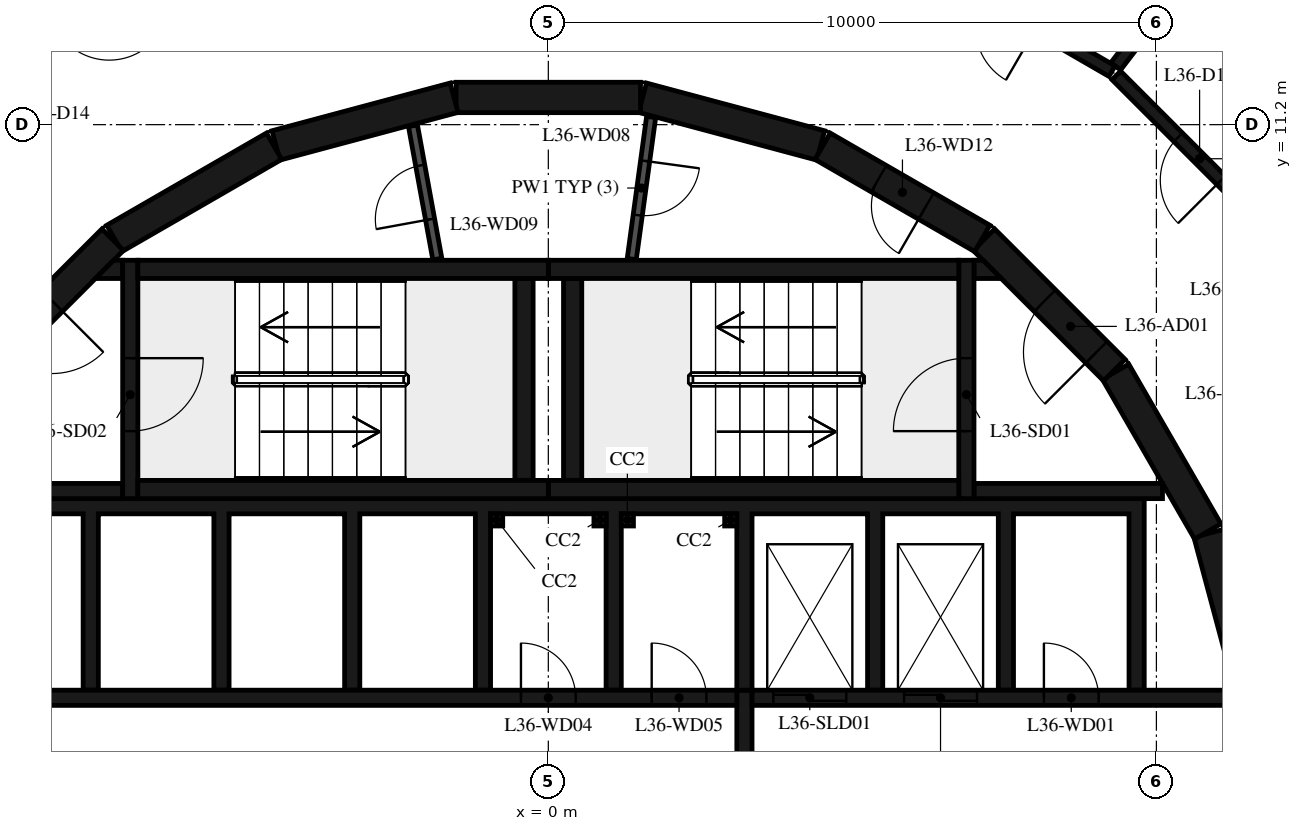
"""IFC4 building model, lengths in metres.
Left out: names, types, materials, properties, quantities, classifications, styles, units other than length and angle.
Written with IfcOpenShell. Run it as: python <this file> out.ifc"""

import sys

from ifc_helpers import new_model, si_unit, direction, frame, frame_2d, origin, origin_2d, place, context, subcontext, project, spatial, polyline, rectangle, outline, extrude, element, fill, save


model = new_model("IFC4")
c1 = context("Model", 3, precision=1e-05, world=origin(), true_north=direction((0.0, 1.0)))
c2 = subcontext(c1, "Body", "Model", "MODEL_VIEW")
j1 = project(units=[si_unit("LENGTHUNIT", "METRE"), si_unit("PLANEANGLEUNIT", "RADIAN")], contexts=[c1])
p1 = place(None, origin())
s1 = spatial("IfcSite", under=j1, at=p1, CompositionType="ELEMENT")
p2 = place(p1, origin())
s2 = spatial("IfcBuilding", under=s1, at=p2, CompositionType="ELEMENT")
p3 = place(p2, frame((0.0, 0.0, 144.9)))
s3 = spatial("IfcBuildingStorey", under=s2, at=p3, CompositionType="ELEMENT", Elevation=144.9)
for number, where, z_axis, x_axis in (
    (1, (-0.85, 4.7, 0.0), (0.0, 0.0, 1.0), (1.0, 0.0, 0.0)),
    (2, (0.85, 4.7, 0.0), (0.0, 0.0, 1.0), (1.0, 0.0, 0.0)),
    (3, (1.3, 4.7, 0.0), (0.0, 0.0, 1.0), (1.0, 0.0, 0.0)),
    (4, (3.0, 4.7, 0.0), (0.0, 0.0, 1.0), (1.0, 0.0, 0.0)),
):
    element("IfcColumn", number, at=place(p3, frame(where, z_axis=z_axis, x_axis=x_axis)), inside=s3, PredefinedType="COLUMN", context=c2, shape_type="SweptSolid", body=[
        extrude(rectangle(XDim=0.2, YDim=0.2, at=origin_2d()), origin(), (0.0, 0.0, 1.0), 4.75),
    ])
for number, where, z_axis, x_axis in (
    (5, (11.643, 1.55, 0.0), (0.0, 0.0, 1.0), (-0.259, 0.966, 0.0)),
    (6, (10.845, 4.51, 0.0), (0.0, 0.0, 1.0), (-0.5, 0.866, 0.0)),
):
    element("IfcWall", number, at=place(p3, frame(where, z_axis=z_axis, x_axis=x_axis)), inside=s3, PredefinedType="SHEAR", context=c2, shape_type="SweptSolid", body=[
        extrude(rectangle(XDim=3.033, YDim=0.5, at=frame_2d((1.516, 0.0))), origin(), (0.0, 0.0, 1.0), 6.35),
    ])
p4 = place(p3, frame((9.308, 7.164, 0.0), z_axis=(0.0, 0.0, 1.0), x_axis=(-0.707106781187, 0.707106781187, 0.0)))
e7 = element("IfcWall", 7, at=p4, inside=s3, PredefinedType="SHEAR", context=c2, shape_type="SweptSolid", body=[
    extrude(rectangle(XDim=3.032, YDim=0.5, at=frame_2d((1.516, 0.0))), origin(), (0.0, 0.0, 1.0), 6.35),
])
p5 = place(p4, frame((0.416, 0.0, 0.0)))
e8 = element("IfcOpeningElement", 8, at=p5, cuts=e7, PredefinedType="OPENING", context=c2, shape_type="SweptSolid", body=[
    extrude(rectangle(XDim=1.2, YDim=2.1, at=frame_2d((0.6, 1.05))), frame((0.0, 0.26, 0.0), z_axis=(0.0, -1.0, 0.0), x_axis=(1.0, 0.0, 0.0)), (0.0, 0.0, 1.0), 0.52),
])
p6 = place(p3, frame((7.137, 9.329, 0.0), z_axis=(0.0, 0.0, 1.0), x_axis=(-0.865975092491, 0.500087131594, 0.0)))
e9 = element("IfcWall", 9, at=p6, inside=s3, PredefinedType="SHEAR", context=c2, shape_type="SweptSolid", body=[
    extrude(rectangle(XDim=3.033, YDim=0.5, at=frame_2d((1.516, 0.0))), origin(), (0.0, 0.0, 1.0), 6.35),
])
p7 = place(p6, frame((1.066, 0.0, 0.0)))
e10 = element("IfcOpeningElement", 10, at=p7, cuts=e9, PredefinedType="OPENING", context=c2, shape_type="SweptSolid", body=[
    extrude(rectangle(XDim=0.9, YDim=2.1, at=frame_2d((0.45, 1.05))), frame((0.0, 0.26, 0.0), z_axis=(0.0, -1.0, 0.0), x_axis=(1.0, 0.0, 0.0)), (0.0, 0.0, 1.0), 0.52),
])
for number, where, z_axis, x_axis in (
    (11, (4.479, 10.858, 0.0), (0.0, 0.0, 1.0), (-0.966, 0.259, 0.0)),
    (12, (1.516, 11.647, 0.0), (0.0, 0.0, 1.0), (-1.0, 0.0, 0.0)),
    (13, (-1.55, 11.643, 0.0), (0.0, 0.0, 1.0), (-0.966, -0.259, 0.0)),
    (14, (-4.51, 10.845, 0.0), (0.0, 0.0, 1.0), (-0.866, -0.5, 0.0)),
):
    element("IfcWall", number, at=place(p3, frame(where, z_axis=z_axis, x_axis=x_axis)), inside=s3, PredefinedType="SHEAR", context=c2, shape_type="SweptSolid", body=[
        extrude(rectangle(XDim=3.033, YDim=0.5, at=frame_2d((1.516, 0.0))), origin(), (0.0, 0.0, 1.0), 6.35),
    ])
p8 = place(p3, frame((-7.164, 9.308, 0.0), z_axis=(0.0, 0.0, 1.0), x_axis=(-0.707106781187, -0.707106781187, 0.0)))
e15 = element("IfcWall", 15, at=p8, inside=s3, PredefinedType="SHEAR", context=c2, shape_type="SweptSolid", body=[
    extrude(rectangle(XDim=3.032, YDim=0.5, at=frame_2d((1.516, 0.0))), origin(), (0.0, 0.0, 1.0), 6.35),
])
p9 = place(p8, frame((1.416, 0.0, 0.0)))
e16 = element("IfcOpeningElement", 16, at=p9, cuts=e15, PredefinedType="OPENING", context=c2, shape_type="SweptSolid", body=[
    extrude(rectangle(XDim=1.2, YDim=2.1, at=frame_2d((0.6, 1.05))), frame((0.0, 0.26, 0.0), z_axis=(0.0, -1.0, 0.0), x_axis=(1.0, 0.0, 0.0)), (0.0, 0.0, 1.0), 0.52),
])
for number, where, z_axis, x_axis in (
    (17, (0.0, 5.2, 0.0), (0.0, 0.0, 1.0), (1.0, 0.0, 0.0)),
    (18, (0.0, 8.82, 0.0), (0.0, 0.0, 1.0), (1.0, 0.0, 0.0)),
):
    element("IfcWall", number, at=place(p3, frame(where, z_axis=z_axis, x_axis=x_axis)), inside=s3, PredefinedType="SHEAR", context=c2, shape_type="SweptSolid", body=[
        extrude(rectangle(XDim=6.75, YDim=0.3, at=frame_2d((3.375, 0.0))), origin(), (0.0, 0.0, 1.0), 6.35),
    ])
p10 = place(p3, frame((0.4, 5.35, 0.0), z_axis=(0.0, 0.0, 1.0), x_axis=(0.0, 1.0, 0.0)))
e19 = element("IfcWall", 19, at=p10, inside=s3, PredefinedType="SHEAR", context=c2, shape_type="SweptSolid", body=[
    extrude(rectangle(XDim=3.32, YDim=0.3, at=frame_2d((1.66, 0.0))), origin(), (0.0, 0.0, 1.0), 6.35),
])
p11 = place(p3, frame((6.875, 5.05, 0.0), z_axis=(0.0, 0.0, 1.0), x_axis=(0.0, 1.0, 0.0)))
e20 = element("IfcWall", 20, at=p11, inside=s3, PredefinedType="SHEAR", context=c2, shape_type="SweptSolid", body=[
    extrude(rectangle(XDim=3.92, YDim=0.25, at=frame_2d((1.96, 0.0))), origin(), (0.0, 0.0, 1.0), 6.35),
])
p12 = place(p11, frame((1.11, 0.0, 0.0)))
e21 = element("IfcOpeningElement", 21, at=p12, cuts=e20, PredefinedType="OPENING", context=c2, shape_type="SweptSolid", body=[
    extrude(rectangle(XDim=1.2, YDim=2.1, at=frame_2d((0.6, 1.05))), frame((0.0, 0.135, 0.0), z_axis=(0.0, -1.0, 0.0), x_axis=(1.0, 0.0, 0.0)), (0.0, 0.0, 1.0), 0.27),
])
p13 = place(p3, frame((7.0, 5.175, 0.0), z_axis=(0.0, 0.0, 1.0), x_axis=(1.0, 0.0, 0.0)))
e22 = element("IfcWall", 22, at=p13, inside=s3, PredefinedType="SHEAR", context=c2, shape_type="SweptSolid", body=[
    extrude(rectangle(XDim=3.1, YDim=0.25, at=frame_2d((1.55, 0.0))), origin(), (0.0, 0.0, 1.0), 6.35),
])
p14 = place(p3, origin())
e23 = element("IfcWall", 23, at=p14, inside=s3, PredefinedType="SHEAR", context=c2, shape_type="SweptSolid", body=[
    extrude(outline(polyline([(7.448, 8.67), (7.0, 8.67), (7.0, 8.97), (7.148, 8.97), (7.448, 8.67)])), origin(), (0.0, 0.0, 1.0), 6.35),
])
for number, where, z_axis, x_axis in (
    (24, (-6.75, 5.2, 0.0), (0.0, 0.0, 1.0), (1.0, 0.0, 0.0)),
    (25, (-6.75, 8.82, 0.0), (0.0, 0.0, 1.0), (1.0, 0.0, 0.0)),
):
    element("IfcWall", number, at=place(p3, frame(where, z_axis=z_axis, x_axis=x_axis)), inside=s3, PredefinedType="SHEAR", context=c2, shape_type="SweptSolid", body=[
        extrude(rectangle(XDim=6.75, YDim=0.3, at=frame_2d((3.375, 0.0))), origin(), (0.0, 0.0, 1.0), 6.35),
    ])
p15 = place(p3, frame((-0.4, 5.35, 0.0), z_axis=(0.0, 0.0, 1.0), x_axis=(0.0, 1.0, 0.0)))
e26 = element("IfcWall", 26, at=p15, inside=s3, PredefinedType="SHEAR", context=c2, shape_type="SweptSolid", body=[
    extrude(rectangle(XDim=3.32, YDim=0.3, at=frame_2d((1.66, 0.0))), origin(), (0.0, 0.0, 1.0), 6.35),
])
p16 = place(p3, frame((-6.875, 8.97, 0.0), z_axis=(0.0, 0.0, 1.0), x_axis=(0.0, -1.0, 0.0)))
e27 = element("IfcWall", 27, at=p16, inside=s3, PredefinedType="SHEAR", context=c2, shape_type="SweptSolid", body=[
    extrude(rectangle(XDim=3.92, YDim=0.25, at=frame_2d((1.96, 0.0))), origin(), (0.0, 0.0, 1.0), 6.35),
])
p17 = place(p16, frame((1.61, 0.0, 0.0)))
e28 = element("IfcOpeningElement", 28, at=p17, cuts=e27, PredefinedType="OPENING", context=c2, shape_type="SweptSolid", body=[
    extrude(rectangle(XDim=1.2, YDim=2.1, at=frame_2d((0.6, 1.05))), frame((0.0, 0.135, 0.0), z_axis=(0.0, -1.0, 0.0), x_axis=(1.0, 0.0, 0.0)), (0.0, 0.0, 1.0), 0.27),
])
p18 = place(p3, frame((-7.0, 5.175, 0.0), z_axis=(0.0, 0.0, 1.0), x_axis=(-1.0, 0.0, 0.0)))
e29 = element("IfcWall", 29, at=p18, inside=s3, PredefinedType="SHEAR", context=c2, shape_type="SweptSolid", body=[
    extrude(rectangle(XDim=3.1, YDim=0.25, at=frame_2d((1.55, 0.0))), origin(), (0.0, 0.0, 1.0), 6.35),
])
p19 = place(p3, origin())
e30 = element("IfcWall", 30, at=p19, inside=s3, PredefinedType="SHEAR", context=c2, shape_type="SweptSolid", body=[
    extrude(outline(polyline([(-7.148, 8.97), (-7.0, 8.97), (-7.0, 8.67), (-7.448, 8.67), (-7.148, 8.97)])), origin(), (0.0, 0.0, 1.0), 6.35),
])
p20 = place(p3, origin())
e31 = element("IfcWall", 31, at=p20, inside=s3, PredefinedType="SHEAR", context=c2, shape_type="SweptSolid", body=[
    extrude(outline(polyline([(-9.55, 4.8), (-7.65, 4.8), (-7.65, 1.9), (-7.4, 1.9), (-7.4, 4.8), (-5.5, 4.8), (-5.5, 1.9), (-5.25, 1.9), (-5.25, 4.8), (-3.35, 4.8), (-3.35, 1.9), (-3.1, 1.9), (-3.1, 4.8), (-1.2, 4.8), (-1.2, 1.9), (-0.95, 1.9), (-0.95, 4.8), (0.95, 4.8), (0.95, 1.9), (1.2, 1.9), (1.2, 4.8), (3.1, 4.8), (3.1, 1.9), (3.35, 1.9), (3.35, 4.8), (5.25, 4.8), (5.25, 1.9), (5.5, 1.9), (5.5, 4.8), (7.4, 4.8), (7.4, 1.9), (7.65, 1.9), (7.65, 4.8), (9.55, 4.8), (9.55, 1.9), (9.8, 1.9), (9.8, 4.8), (9.8, 5.05), (-9.8, 5.05), (-9.8, 4.8), (-9.8, 1.9), (-9.55, 1.9), (-9.55, 4.8)])), origin(), (0.0, 0.0, 1.0), 6.35),
])
p21 = place(p3, frame((-11.28, 1.775, 0.0), z_axis=(0.0, 0.0, 1.0), x_axis=(1.0, 0.0, 0.0)))
e32 = element("IfcWall", 32, at=p21, inside=s3, PredefinedType="SHEAR", context=c2, shape_type="SweptSolid", body=[
    extrude(rectangle(XDim=14.38, YDim=0.25, at=frame_2d((7.19, 0.0))), origin(), (0.0, 0.0, 1.0), 6.35),
])
p22 = place(p21, frame((10.83, 0.0, 0.0)))
e33 = element("IfcOpeningElement", 33, at=p22, cuts=e32, PredefinedType="OPENING", context=c2, shape_type="SweptSolid", body=[
    extrude(rectangle(XDim=0.9, YDim=2.1, at=frame_2d((0.45, 1.05))), frame((0.0, 0.135, 0.0), z_axis=(0.0, -1.0, 0.0), x_axis=(1.0, 0.0, 0.0)), (0.0, 0.0, 1.0), 0.27),
])
p23 = place(p21, frame((12.98, 0.0, 0.0)))
e34 = element("IfcOpeningElement", 34, at=p23, cuts=e32, PredefinedType="OPENING", context=c2, shape_type="SweptSolid", body=[
    extrude(rectangle(XDim=0.9, YDim=2.1, at=frame_2d((0.45, 1.05))), frame((0.0, 0.135, 0.0), z_axis=(0.0, -1.0, 0.0), x_axis=(1.0, 0.0, 0.0)), (0.0, 0.0, 1.0), 0.27),
])
p24 = place(p3, frame((3.35, 1.775, 0.0), z_axis=(0.0, 0.0, 1.0), x_axis=(1.0, 0.0, 0.0)))
e35 = element("IfcWall", 35, at=p24, inside=s3, PredefinedType="SHEAR", context=c2, shape_type="SweptSolid", body=[
    extrude(rectangle(XDim=7.93, YDim=0.25, at=frame_2d((3.965, 0.0))), origin(), (0.0, 0.0, 1.0), 6.35),
])
p25 = place(p24, frame((0.35, 0.0, 0.0)))
e36 = element("IfcOpeningElement", 36, at=p25, cuts=e35, PredefinedType="OPENING", context=c2, shape_type="SweptSolid", body=[
    extrude(rectangle(XDim=1.2, YDim=2.4, at=frame_2d((0.6, 1.2))), frame((0.0, 0.135, 0.0), z_axis=(0.0, -1.0, 0.0), x_axis=(1.0, 0.0, 0.0)), (0.0, 0.0, 1.0), 0.27),
])
p26 = place(p24, frame((2.5, 0.0, 0.0)))
e37 = element("IfcOpeningElement", 37, at=p26, cuts=e35, PredefinedType="OPENING", context=c2, shape_type="SweptSolid", body=[
    extrude(rectangle(XDim=1.2, YDim=2.4, at=frame_2d((0.6, 1.2))), frame((0.0, 0.135, 0.0), z_axis=(0.0, -1.0, 0.0), x_axis=(1.0, 0.0, 0.0)), (0.0, 0.0, 1.0), 0.27),
])
p27 = place(p24, frame((4.8, 0.0, 0.0)))
e38 = element("IfcOpeningElement", 38, at=p27, cuts=e35, PredefinedType="OPENING", context=c2, shape_type="SweptSolid", body=[
    extrude(rectangle(XDim=0.9, YDim=2.1, at=frame_2d((0.45, 1.05))), frame((0.0, 0.135, 0.0), z_axis=(0.0, -1.0, 0.0), x_axis=(1.0, 0.0, 0.0)), (0.0, 0.0, 1.0), 0.27),
])
p28 = place(p3, frame((3.225, -1.9, 0.0), z_axis=(0.0, 0.0, 1.0), x_axis=(0.0, 1.0, 0.0)))
e39 = element("IfcWall", 39, at=p28, inside=s3, PredefinedType="SHEAR", context=c2, shape_type="SweptSolid", body=[
    extrude(rectangle(XDim=3.8, YDim=0.25, at=frame_2d((1.9, 0.0))), origin(), (0.0, 0.0, 1.0), 6.35),
])
p29 = place(p3, frame((1.691, 11.326, 0.0), z_axis=(0.0, 0.0, 1.0), x_axis=(-0.135344253201, -0.990798633994, 0.0)))
e40 = element("IfcWall", 40, at=p29, inside=s3, PredefinedType="PARTITIONING", context=c2, shape_type="SweptSolid", body=[
    extrude(rectangle(XDim=2.358, YDim=0.15, at=frame_2d((1.179, 0.0))), origin(), (0.0, 0.0, 1.0), 6.35),
])
p30 = place(p29, frame((0.729, 0.0, 0.0)))
e41 = element("IfcOpeningElement", 41, at=p30, cuts=e40, PredefinedType="OPENING", context=c2, shape_type="SweptSolid", body=[
    extrude(rectangle(XDim=0.9, YDim=2.1, at=frame_2d((0.45, 1.05))), frame((0.0, 0.085, 0.0), z_axis=(0.0, -1.0, 0.0), x_axis=(1.0, 0.0, 0.0)), (0.0, 0.0, 1.0), 0.17),
])
p31 = place(p3, frame((-1.825, 8.99, 0.0), z_axis=(0.0, 0.0, 1.0), x_axis=(-0.179955206115, 0.983674805915, 0.0)))
e42 = element("IfcWall", 42, at=p31, inside=s3, PredefinedType="PARTITIONING", context=c2, shape_type="SweptSolid", body=[
    extrude(rectangle(XDim=2.229, YDim=0.15, at=frame_2d((1.115, 0.0))), origin(), (0.0, 0.0, 1.0), 6.35),
])
p32 = place(p31, frame((0.665, 0.0, 0.0)))
e43 = element("IfcOpeningElement", 43, at=p32, cuts=e42, PredefinedType="OPENING", context=c2, shape_type="SweptSolid", body=[
    extrude(rectangle(XDim=0.9, YDim=2.1, at=frame_2d((0.45, 1.05))), frame((0.0, 0.085, 0.0), z_axis=(0.0, -1.0, 0.0), x_axis=(1.0, 0.0, 0.0)), (0.0, 0.0, 1.0), 0.17),
])
p33 = place(p3, frame((-6.147, 13.88, 0.0), z_axis=(0.0, 0.0, 1.0), x_axis=(-0.866380576307, -0.499384317933, 0.0)))
e44 = element("IfcWall", 44, at=p33, inside=s3, PredefinedType="PARTITIONING", context=c2, shape_type="SweptSolid", body=[
    extrude(rectangle(XDim=3.48, YDim=0.2, at=frame_2d((1.74, 0.0))), origin(), (0.0, 0.0, 1.0), 6.35),
])
p34 = place(p33, frame((1.24, 0.0, 0.0)))
e45 = element("IfcOpeningElement", 45, at=p34, cuts=e44, PredefinedType="OPENING", context=c2, shape_type="SweptSolid", body=[
    extrude(rectangle(XDim=1.0, YDim=2.1, at=frame_2d((0.5, 1.05))), frame((0.0, 0.11, 0.0), z_axis=(0.0, -1.0, 0.0), x_axis=(1.0, 0.0, 0.0)), (0.0, 0.0, 1.0), 0.22),
])
p35 = place(p3, frame((9.27, 12.08, 0.0), z_axis=(0.0, 0.0, 1.0), x_axis=(-0.865601686425, 0.500733182901, 0.0)))
e46 = element("IfcWall", 46, at=p35, inside=s3, PredefinedType="PARTITIONING", context=c2, shape_type="SweptSolid", body=[
    extrude(rectangle(XDim=3.874, YDim=0.2, at=frame_2d((1.937, 0.0))), origin(), (0.0, 0.0, 1.0), 6.35),
])
p36 = place(p35, frame((1.437, 0.0, 0.0)))
e47 = element("IfcOpeningElement", 47, at=p36, cuts=e46, PredefinedType="OPENING", context=c2, shape_type="SweptSolid", body=[
    extrude(rectangle(XDim=1.0, YDim=2.1, at=frame_2d((0.5, 1.05))), frame((0.0, 0.11, 0.0), z_axis=(0.0, -1.0, 0.0), x_axis=(1.0, 0.0, 0.0)), (0.0, 0.0, 1.0), 0.22),
])
p37 = place(p3, frame((9.331, 12.159, 0.0), z_axis=(0.0, 0.0, 1.0), x_axis=(0.608107648531, 0.793854575976, 0.0)))
e48 = element("IfcWall", 48, at=p37, inside=s3, PredefinedType="PARTITIONING", context=c2, shape_type="SweptSolid", body=[
    extrude(rectangle(XDim=3.83, YDim=0.2, at=frame_2d((1.915, 0.0))), origin(), (0.0, 0.0, 1.0), 6.35),
])
p38 = place(p3, frame((12.08, 9.27, 0.0), z_axis=(0.0, 0.0, 1.0), x_axis=(-0.707106781187, 0.707106781187, 0.0)))
e49 = element("IfcWall", 49, at=p38, inside=s3, PredefinedType="PARTITIONING", context=c2, shape_type="SweptSolid", body=[
    extrude(rectangle(XDim=3.874, YDim=0.2, at=frame_2d((1.937, 0.0))), origin(), (0.0, 0.0, 1.0), 6.35),
])
p39 = place(p38, frame((1.437, 0.0, 0.0)))
e50 = element("IfcOpeningElement", 50, at=p39, cuts=e49, PredefinedType="OPENING", context=c2, shape_type="SweptSolid", body=[
    extrude(rectangle(XDim=1.0, YDim=2.1, at=frame_2d((0.5, 1.05))), frame((0.0, 0.11, 0.0), z_axis=(0.0, -1.0, 0.0), x_axis=(1.0, 0.0, 0.0)), (0.0, 0.0, 1.0), 0.22),
])
p40 = place(p12, origin())
e51 = element("IfcDoor", 51, at=p40, inside=s3, OperationType="SINGLE_SWING_LEFT", PredefinedType="DOOR", context=c2, shape_type="SweptSolid", body=[
    extrude(rectangle(XDim=1.2, YDim=2.1, at=frame_2d((0.6, 1.05))), frame((0.0, 0.025, 0.0), z_axis=(0.0, -1.0, 0.0), x_axis=(1.0, 0.0, 0.0)), (0.0, 0.0, 1.0), 0.05),
])
fill(e21, e51)
p41 = place(p5, origin())
e52 = element("IfcDoor", 52, at=p41, inside=s3, OperationType="SINGLE_SWING_RIGHT", PredefinedType="DOOR", context=c2, shape_type="SweptSolid", body=[
    extrude(rectangle(XDim=1.2, YDim=2.1, at=frame_2d((0.6, 1.05))), frame((0.0, 0.025, 0.0), z_axis=(0.0, -1.0, 0.0), x_axis=(1.0, 0.0, 0.0)), (0.0, 0.0, 1.0), 0.05),
])
fill(e8, e52)
p42 = place(p17, origin())
e53 = element("IfcDoor", 53, at=p42, inside=s3, OperationType="SINGLE_SWING_LEFT", PredefinedType="DOOR", context=c2, shape_type="SweptSolid", body=[
    extrude(rectangle(XDim=1.2, YDim=2.1, at=frame_2d((0.6, 1.05))), frame((0.0, 0.025, 0.0), z_axis=(0.0, -1.0, 0.0), x_axis=(1.0, 0.0, 0.0)), (0.0, 0.0, 1.0), 0.05),
])
fill(e28, e53)
p43 = place(p9, origin())
e54 = element("IfcDoor", 54, at=p43, inside=s3, OperationType="SINGLE_SWING_RIGHT", PredefinedType="DOOR", context=c2, shape_type="SweptSolid", body=[
    extrude(rectangle(XDim=1.2, YDim=2.1, at=frame_2d((0.6, 1.05))), frame((0.0, 0.025, 0.0), z_axis=(0.0, -1.0, 0.0), x_axis=(1.0, 0.0, 0.0)), (0.0, 0.0, 1.0), 0.05),
])
fill(e16, e54)
p44 = place(p25, origin())
e55 = element("IfcDoor", 55, at=p44, inside=s3, OperationType="DOUBLE_DOOR_SLIDING", PredefinedType="DOOR", context=c2, shape_type="SweptSolid", body=[
    extrude(rectangle(XDim=1.2, YDim=2.4, at=frame_2d((0.6, 1.2))), frame((0.0, 0.025, 0.0), z_axis=(0.0, -1.0, 0.0), x_axis=(1.0, 0.0, 0.0)), (0.0, 0.0, 1.0), 0.05),
])
fill(e36, e55)
p45 = place(p26, origin())
e56 = element("IfcDoor", 56, at=p45, inside=s3, OperationType="DOUBLE_DOOR_SLIDING", PredefinedType="DOOR", context=c2, shape_type="SweptSolid", body=[
    extrude(rectangle(XDim=1.2, YDim=2.4, at=frame_2d((0.6, 1.2))), frame((0.0, 0.025, 0.0), z_axis=(0.0, -1.0, 0.0), x_axis=(1.0, 0.0, 0.0)), (0.0, 0.0, 1.0), 0.05),
])
fill(e37, e56)
p46 = place(p27, origin())
e57 = element("IfcDoor", 57, at=p46, inside=s3, OperationType="SINGLE_SWING_RIGHT", PredefinedType="DOOR", context=c2, shape_type="SweptSolid", body=[
    extrude(rectangle(XDim=0.9, YDim=2.1, at=frame_2d((0.45, 1.05))), frame((0.0, 0.025, 0.0), z_axis=(0.0, -1.0, 0.0), x_axis=(1.0, 0.0, 0.0)), (0.0, 0.0, 1.0), 0.05),
])
fill(e38, e57)
p47 = place(p22, origin())
e58 = element("IfcDoor", 58, at=p47, inside=s3, OperationType="SINGLE_SWING_LEFT", PredefinedType="DOOR", context=c2, shape_type="SweptSolid", body=[
    extrude(rectangle(XDim=0.9, YDim=2.1, at=frame_2d((0.45, 1.05))), frame((0.0, 0.025, 0.0), z_axis=(0.0, -1.0, 0.0), x_axis=(1.0, 0.0, 0.0)), (0.0, 0.0, 1.0), 0.05),
])
fill(e33, e58)
p48 = place(p23, origin())
e59 = element("IfcDoor", 59, at=p48, inside=s3, OperationType="SINGLE_SWING_RIGHT", PredefinedType="DOOR", context=c2, shape_type="SweptSolid", body=[
    extrude(rectangle(XDim=0.9, YDim=2.1, at=frame_2d((0.45, 1.05))), frame((0.0, 0.025, 0.0), z_axis=(0.0, -1.0, 0.0), x_axis=(1.0, 0.0, 0.0)), (0.0, 0.0, 1.0), 0.05),
])
fill(e34, e59)
p49 = place(p30, origin())
e60 = element("IfcDoor", 60, at=p49, inside=s3, OperationType="SINGLE_SWING_LEFT", PredefinedType="DOOR", context=c2, shape_type="SweptSolid", body=[
    extrude(rectangle(XDim=0.9, YDim=2.1, at=frame_2d((0.45, 1.05))), frame((0.0, 0.025, 0.0), z_axis=(0.0, -1.0, 0.0), x_axis=(1.0, 0.0, 0.0)), (0.0, 0.0, 1.0), 0.05),
])
fill(e41, e60)
p50 = place(p32, origin())
e61 = element("IfcDoor", 61, at=p50, inside=s3, OperationType="SINGLE_SWING_RIGHT", PredefinedType="DOOR", context=c2, shape_type="SweptSolid", body=[
    extrude(rectangle(XDim=0.9, YDim=2.1, at=frame_2d((0.45, 1.05))), frame((0.0, 0.025, 0.0), z_axis=(0.0, -1.0, 0.0), x_axis=(1.0, 0.0, 0.0)), (0.0, 0.0, 1.0), 0.05),
])
fill(e43, e61)
p51 = place(p7, origin())
e62 = element("IfcDoor", 62, at=p51, inside=s3, OperationType="SINGLE_SWING_LEFT", PredefinedType="DOOR", context=c2, shape_type="SweptSolid", body=[
    extrude(rectangle(XDim=0.9, YDim=2.1, at=frame_2d((0.45, 1.05))), frame((0.0, 0.025, 0.0), z_axis=(0.0, -1.0, 0.0), x_axis=(1.0, 0.0, 0.0)), (0.0, 0.0, 1.0), 0.05),
])
fill(e10, e62)
p52 = place(p39, origin())
e63 = element("IfcDoor", 63, at=p52, inside=s3, OperationType="SINGLE_SWING_LEFT", PredefinedType="DOOR", context=c2, shape_type="SweptSolid", body=[
    extrude(rectangle(XDim=1.0, YDim=2.1, at=frame_2d((0.5, 1.05))), frame((0.0, 0.025, 0.0), z_axis=(0.0, -1.0, 0.0), x_axis=(1.0, 0.0, 0.0)), (0.0, 0.0, 1.0), 0.05),
])
fill(e50, e63)
save(model, sys.argv[1])
